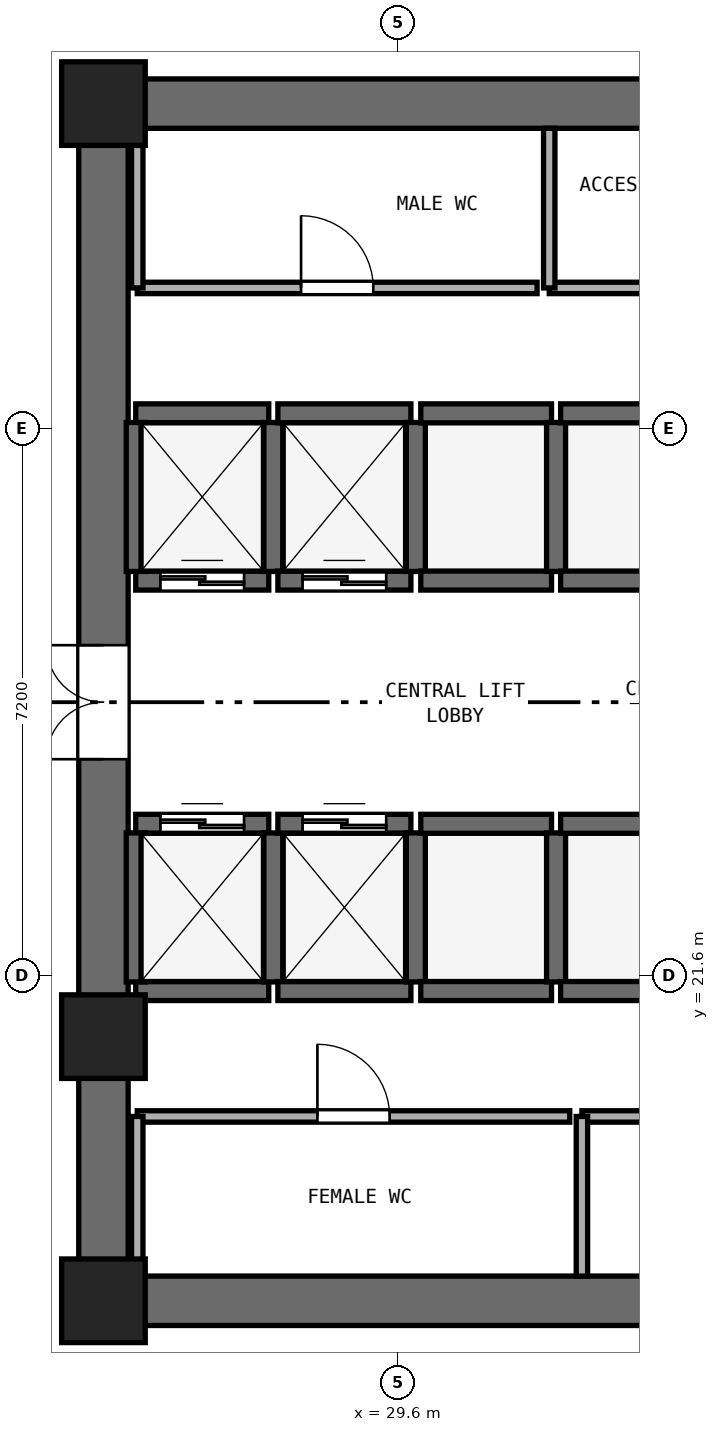
"""IFC4 building model, lengths in metres.
Left out: names, types, materials, properties, quantities, classifications, styles, units other than length and angle.
Written with IfcOpenShell. Run it as: python <this file> out.ifc"""

import sys

from ifc_helpers import new_model, si_unit, direction, frame, frame_2d, origin, origin_2d, place, context, subcontext, project, spatial, rectangle, extrude, element, fill, save


model = new_model("IFC4")
c1 = context("Model", 3, precision=1e-05, world=origin(), true_north=direction((0.0, 1.0)))
c2 = subcontext(c1, "Body", "Model", "MODEL_VIEW")
j1 = project(units=[si_unit("LENGTHUNIT", "METRE"), si_unit("PLANEANGLEUNIT", "RADIAN")], contexts=[c1])
p1 = place(None, origin())
s1 = spatial("IfcSite", under=j1, at=p1, CompositionType="ELEMENT")
p2 = place(p1, origin())
s2 = spatial("IfcBuilding", under=s1, at=p2, CompositionType="ELEMENT")
p3 = place(p2, frame((0.0, 0.0, 89.6)))
s3 = spatial("IfcBuildingStorey", under=s2, at=p3, CompositionType="ELEMENT", Elevation=89.6)
for number, where, z_axis, x_axis in (
    (1, (25.4, 17.325, 0.0), (0.0, 0.0, 1.0), (1.0, 0.0, 0.0)),
    (2, (25.4, 33.075, 0.0), (0.0, 0.0, 1.0), (1.0, 0.0, 0.0)),
):
    element("IfcWall", number, at=place(p3, frame(where, z_axis=z_axis, x_axis=x_axis)), inside=s3, PredefinedType="SHEAR", context=c2, shape_type="SweptSolid", body=[
        extrude(rectangle(XDim=23.2, YDim=0.65, at=frame_2d((11.6, 0.0))), origin(), (0.0, 0.0, 1.0), 3.525),
    ])
p4 = place(p3, frame((25.725, 17.65, 0.0), z_axis=(0.0, 0.0, 1.0), x_axis=(0.0, 1.0, 0.0)))
e3 = element("IfcWall", 3, at=p4, inside=s3, PredefinedType="SHEAR", context=c2, shape_type="SweptSolid", body=[
    extrude(rectangle(XDim=15.1, YDim=0.65, at=frame_2d((7.55, 0.0))), origin(), (0.0, 0.0, 1.0), 3.525),
])
p5 = place(p4, frame((6.8, 0.0, 0.0)))
e4 = element("IfcOpeningElement", 4, at=p5, cuts=e3, PredefinedType="OPENING", context=c2, shape_type="SweptSolid", body=[
    extrude(rectangle(XDim=1.5, YDim=2.15, at=frame_2d((0.75, 1.075))), frame((0.0, 0.335, 0.0), z_axis=(0.0, -1.0, 0.0), x_axis=(1.0, 0.0, 0.0)), (0.0, 0.0, 1.0), 0.67),
])
for number, where, z_axis, x_axis in (
    (5, (25.725, 17.325, 0.0), (0.0, 0.0, 1.0), (1.0, 0.0, 0.0)),
    (6, (25.725, 33.075, 0.0), (0.0, 0.0, 1.0), (1.0, 0.0, 0.0)),
    (7, (25.725, 20.8, 0.0), (0.0, 0.0, 1.0), (1.0, 0.0, 0.0)),
):
    element("IfcColumn", number, at=place(p3, frame(where, z_axis=z_axis, x_axis=x_axis)), inside=s3, PredefinedType="PILASTER", context=c2, shape_type="SweptSolid", body=[
        extrude(rectangle(XDim=1.1, YDim=1.1, at=origin_2d()), origin(), (0.0, 0.0, 1.0), 3.8),
    ])
p6 = place(p3, frame((26.15, 26.8, 0.0), z_axis=(0.0, 0.0, 1.0), x_axis=(1.0, 0.0, 0.0)))
e8 = element("IfcWall", 8, at=p6, inside=s3, PredefinedType="SHEAR", context=c2, shape_type="SweptSolid", body=[
    extrude(rectangle(XDim=1.75, YDim=0.25, at=frame_2d((0.875, 0.0))), origin(), (0.0, 0.0, 1.0), 3.525),
])
p7 = place(p6, frame((0.325, 0.0, 0.0)))
e9 = element("IfcOpeningElement", 9, at=p7, cuts=e8, PredefinedType="OPENING", context=c2, shape_type="SweptSolid", body=[
    extrude(rectangle(XDim=1.1, YDim=2.15, at=frame_2d((0.55, 1.075))), frame((0.0, 0.135, 0.0), z_axis=(0.0, -1.0, 0.0), x_axis=(1.0, 0.0, 0.0)), (0.0, 0.0, 1.0), 0.27),
])
p8 = place(p3, frame((26.15, 29.0, 0.0), z_axis=(0.0, 0.0, 1.0), x_axis=(1.0, 0.0, 0.0)))
e10 = element("IfcWall", 10, at=p8, inside=s3, PredefinedType="SHEAR", context=c2, shape_type="SweptSolid", body=[
    extrude(rectangle(XDim=1.75, YDim=0.25, at=frame_2d((0.875, 0.0))), origin(), (0.0, 0.0, 1.0), 3.525),
])
for number, where, z_axis, x_axis in (
    (11, (26.15, 26.92, 0.0), (0.0, 0.0, 1.0), (0.0, 1.0, 0.0)),
    (12, (27.96, 26.92, 0.0), (0.0, 0.0, 1.0), (0.0, 1.0, 0.0)),
):
    element("IfcWall", number, at=place(p3, frame(where, z_axis=z_axis, x_axis=x_axis)), inside=s3, PredefinedType="SHEAR", context=c2, shape_type="SweptSolid", body=[
        extrude(rectangle(XDim=1.96, YDim=0.25, at=frame_2d((0.98, 0.0))), origin(), (0.0, 0.0, 1.0), 3.525),
    ])
p9 = place(p3, frame((28.02, 26.8, 0.0), z_axis=(0.0, 0.0, 1.0), x_axis=(1.0, 0.0, 0.0)))
e13 = element("IfcWall", 13, at=p9, inside=s3, PredefinedType="SHEAR", context=c2, shape_type="SweptSolid", body=[
    extrude(rectangle(XDim=1.75, YDim=0.25, at=frame_2d((0.875, 0.0))), origin(), (0.0, 0.0, 1.0), 3.525),
])
p10 = place(p9, frame((0.325, 0.0, 0.0)))
e14 = element("IfcOpeningElement", 14, at=p10, cuts=e13, PredefinedType="OPENING", context=c2, shape_type="SweptSolid", body=[
    extrude(rectangle(XDim=1.1, YDim=2.15, at=frame_2d((0.55, 1.075))), frame((0.0, 0.135, 0.0), z_axis=(0.0, -1.0, 0.0), x_axis=(1.0, 0.0, 0.0)), (0.0, 0.0, 1.0), 0.27),
])
p11 = place(p3, frame((28.02, 29.0, 0.0), z_axis=(0.0, 0.0, 1.0), x_axis=(1.0, 0.0, 0.0)))
e15 = element("IfcWall", 15, at=p11, inside=s3, PredefinedType="SHEAR", context=c2, shape_type="SweptSolid", body=[
    extrude(rectangle(XDim=1.75, YDim=0.25, at=frame_2d((0.875, 0.0))), origin(), (0.0, 0.0, 1.0), 3.525),
])
p12 = place(p3, frame((29.835, 26.92, 0.0), z_axis=(0.0, 0.0, 1.0), x_axis=(0.0, 1.0, 0.0)))
e16 = element("IfcWall", 16, at=p12, inside=s3, PredefinedType="SHEAR", context=c2, shape_type="SweptSolid", body=[
    extrude(rectangle(XDim=1.96, YDim=0.25, at=frame_2d((0.98, 0.0))), origin(), (0.0, 0.0, 1.0), 3.525),
])
p13 = place(p3, frame((26.15, 21.4, 0.0), z_axis=(0.0, 0.0, 1.0), x_axis=(1.0, 0.0, 0.0)))
e17 = element("IfcWall", 17, at=p13, inside=s3, PredefinedType="SHEAR", context=c2, shape_type="SweptSolid", body=[
    extrude(rectangle(XDim=1.75, YDim=0.25, at=frame_2d((0.875, 0.0))), origin(), (0.0, 0.0, 1.0), 3.525),
])
p14 = place(p3, frame((26.15, 23.6, 0.0), z_axis=(0.0, 0.0, 1.0), x_axis=(1.0, 0.0, 0.0)))
e18 = element("IfcWall", 18, at=p14, inside=s3, PredefinedType="SHEAR", context=c2, shape_type="SweptSolid", body=[
    extrude(rectangle(XDim=1.75, YDim=0.25, at=frame_2d((0.875, 0.0))), origin(), (0.0, 0.0, 1.0), 3.525),
])
p15 = place(p14, frame((0.325, 0.0, 0.0)))
e19 = element("IfcOpeningElement", 19, at=p15, cuts=e18, PredefinedType="OPENING", context=c2, shape_type="SweptSolid", body=[
    extrude(rectangle(XDim=1.1, YDim=2.15, at=frame_2d((0.55, 1.075))), frame((0.0, 0.135, 0.0), z_axis=(0.0, -1.0, 0.0), x_axis=(1.0, 0.0, 0.0)), (0.0, 0.0, 1.0), 0.27),
])
for number, where, z_axis, x_axis in (
    (20, (26.15, 21.52, 0.0), (0.0, 0.0, 1.0), (0.0, 1.0, 0.0)),
    (21, (27.96, 21.52, 0.0), (0.0, 0.0, 1.0), (0.0, 1.0, 0.0)),
):
    element("IfcWall", number, at=place(p3, frame(where, z_axis=z_axis, x_axis=x_axis)), inside=s3, PredefinedType="SHEAR", context=c2, shape_type="SweptSolid", body=[
        extrude(rectangle(XDim=1.96, YDim=0.25, at=frame_2d((0.98, 0.0))), origin(), (0.0, 0.0, 1.0), 3.525),
    ])
p16 = place(p3, frame((28.02, 21.4, 0.0), z_axis=(0.0, 0.0, 1.0), x_axis=(1.0, 0.0, 0.0)))
e22 = element("IfcWall", 22, at=p16, inside=s3, PredefinedType="SHEAR", context=c2, shape_type="SweptSolid", body=[
    extrude(rectangle(XDim=1.75, YDim=0.25, at=frame_2d((0.875, 0.0))), origin(), (0.0, 0.0, 1.0), 3.525),
])
p17 = place(p3, frame((28.02, 23.6, 0.0), z_axis=(0.0, 0.0, 1.0), x_axis=(1.0, 0.0, 0.0)))
e23 = element("IfcWall", 23, at=p17, inside=s3, PredefinedType="SHEAR", context=c2, shape_type="SweptSolid", body=[
    extrude(rectangle(XDim=1.75, YDim=0.25, at=frame_2d((0.875, 0.0))), origin(), (0.0, 0.0, 1.0), 3.525),
])
p18 = place(p17, frame((0.325, 0.0, 0.0)))
e24 = element("IfcOpeningElement", 24, at=p18, cuts=e23, PredefinedType="OPENING", context=c2, shape_type="SweptSolid", body=[
    extrude(rectangle(XDim=1.1, YDim=2.15, at=frame_2d((0.55, 1.075))), frame((0.0, 0.135, 0.0), z_axis=(0.0, -1.0, 0.0), x_axis=(1.0, 0.0, 0.0)), (0.0, 0.0, 1.0), 0.27),
])
p19 = place(p3, frame((29.835, 21.52, 0.0), z_axis=(0.0, 0.0, 1.0), x_axis=(0.0, 1.0, 0.0)))
e25 = element("IfcWall", 25, at=p19, inside=s3, PredefinedType="SHEAR", context=c2, shape_type="SweptSolid", body=[
    extrude(rectangle(XDim=1.96, YDim=0.25, at=frame_2d((0.98, 0.0))), origin(), (0.0, 0.0, 1.0), 3.525),
])
for number, where, z_axis, x_axis in (
    (26, (29.9, 21.4, 0.0), (0.0, 0.0, 1.0), (1.0, 0.0, 0.0)),
    (27, (29.9, 23.6, 0.0), (0.0, 0.0, 1.0), (1.0, 0.0, 0.0)),
):
    element("IfcWall", number, at=place(p3, frame(where, z_axis=z_axis, x_axis=x_axis)), inside=s3, PredefinedType="SHEAR", context=c2, shape_type="SweptSolid", body=[
        extrude(rectangle(XDim=1.72, YDim=0.25, at=frame_2d((0.86, 0.0))), origin(), (0.0, 0.0, 1.0), 3.525),
    ])
p20 = place(p3, frame((31.68, 21.52, 0.0), z_axis=(0.0, 0.0, 1.0), x_axis=(0.0, 1.0, 0.0)))
e28 = element("IfcWall", 28, at=p20, inside=s3, PredefinedType="SHEAR", context=c2, shape_type="SweptSolid", body=[
    extrude(rectangle(XDim=1.96, YDim=0.25, at=frame_2d((0.98, 0.0))), origin(), (0.0, 0.0, 1.0), 3.525),
])
for number, where, z_axis, x_axis in (
    (29, (31.74, 21.4, 0.0), (0.0, 0.0, 1.0), (1.0, 0.0, 0.0)),
    (30, (31.74, 23.6, 0.0), (0.0, 0.0, 1.0), (1.0, 0.0, 0.0)),
):
    element("IfcWall", number, at=place(p3, frame(where, z_axis=z_axis, x_axis=x_axis)), inside=s3, PredefinedType="SHEAR", context=c2, shape_type="SweptSolid", body=[
        extrude(rectangle(XDim=1.72, YDim=0.25, at=frame_2d((0.86, 0.0))), origin(), (0.0, 0.0, 1.0), 3.525),
    ])
for number, where, z_axis, x_axis in (
    (31, (29.9, 26.8, 0.0), (0.0, 0.0, 1.0), (1.0, 0.0, 0.0)),
    (32, (29.9, 29.0, 0.0), (0.0, 0.0, 1.0), (1.0, 0.0, 0.0)),
):
    element("IfcWall", number, at=place(p3, frame(where, z_axis=z_axis, x_axis=x_axis)), inside=s3, PredefinedType="SHEAR", context=c2, shape_type="SweptSolid", body=[
        extrude(rectangle(XDim=1.72, YDim=0.25, at=frame_2d((0.86, 0.0))), origin(), (0.0, 0.0, 1.0), 3.525),
    ])
p21 = place(p3, frame((31.68, 26.92, 0.0), z_axis=(0.0, 0.0, 1.0), x_axis=(0.0, 1.0, 0.0)))
e33 = element("IfcWall", 33, at=p21, inside=s3, PredefinedType="SHEAR", context=c2, shape_type="SweptSolid", body=[
    extrude(rectangle(XDim=1.96, YDim=0.25, at=frame_2d((0.98, 0.0))), origin(), (0.0, 0.0, 1.0), 3.525),
])
for number, where, z_axis, x_axis in (
    (34, (31.74, 26.8, 0.0), (0.0, 0.0, 1.0), (1.0, 0.0, 0.0)),
    (35, (31.74, 29.0, 0.0), (0.0, 0.0, 1.0), (1.0, 0.0, 0.0)),
):
    element("IfcWall", number, at=place(p3, frame(where, z_axis=z_axis, x_axis=x_axis)), inside=s3, PredefinedType="SHEAR", context=c2, shape_type="SweptSolid", body=[
        extrude(rectangle(XDim=1.72, YDim=0.25, at=frame_2d((0.86, 0.0))), origin(), (0.0, 0.0, 1.0), 3.525),
    ])
p22 = place(p3, frame((26.17, 30.65, 0.0), z_axis=(0.0, 0.0, 1.0), x_axis=(1.0, 0.0, 0.0)))
e36 = element("IfcWall", 36, at=p22, inside=s3, PredefinedType="PARTITIONING", context=c2, shape_type="SweptSolid", body=[
    extrude(rectangle(XDim=5.26, YDim=0.15, at=frame_2d((2.63, 0.0))), origin(), (0.0, 0.0, 1.0), 3.525),
])
p23 = place(p22, frame((2.155, 0.0, 0.0)))
e37 = element("IfcOpeningElement", 37, at=p23, cuts=e36, PredefinedType="OPENING", context=c2, shape_type="SweptSolid", body=[
    extrude(rectangle(XDim=0.95, YDim=2.1, at=frame_2d((0.475, 1.05))), frame((0.0, 0.085, 0.0), z_axis=(0.0, -1.0, 0.0), x_axis=(1.0, 0.0, 0.0)), (0.0, 0.0, 1.0), 0.17),
])
p24 = place(p3, frame((26.17, 30.65, 0.0), z_axis=(0.0, 0.0, 1.0), x_axis=(0.0, 1.0, 0.0)))
e38 = element("IfcWall", 38, at=p24, inside=s3, PredefinedType="PARTITIONING", context=c2, shape_type="SweptSolid", body=[
    extrude(rectangle(XDim=2.1, YDim=0.15, at=frame_2d((1.05, 0.0))), origin(), (0.0, 0.0, 1.0), 3.525),
])
p25 = place(p3, frame((31.59, 30.65, 0.0), z_axis=(0.0, 0.0, 1.0), x_axis=(1.0, 0.0, 0.0)))
e39 = element("IfcWall", 39, at=p25, inside=s3, PredefinedType="PARTITIONING", context=c2, shape_type="SweptSolid", body=[
    extrude(rectangle(XDim=5.26, YDim=0.15, at=frame_2d((2.63, 0.0))), origin(), (0.0, 0.0, 1.0), 3.525),
])
p26 = place(p25, frame((2.155, 0.0, 0.0)))
e40 = element("IfcOpeningElement", 40, at=p26, cuts=e39, PredefinedType="OPENING", context=c2, shape_type="SweptSolid", body=[
    extrude(rectangle(XDim=0.95, YDim=2.1, at=frame_2d((0.475, 1.05))), frame((0.0, 0.085, 0.0), z_axis=(0.0, -1.0, 0.0), x_axis=(1.0, 0.0, 0.0)), (0.0, 0.0, 1.0), 0.17),
])
p27 = place(p3, frame((31.59, 30.65, 0.0), z_axis=(0.0, 0.0, 1.0), x_axis=(0.0, 1.0, 0.0)))
e41 = element("IfcWall", 41, at=p27, inside=s3, PredefinedType="PARTITIONING", context=c2, shape_type="SweptSolid", body=[
    extrude(rectangle(XDim=2.1, YDim=0.15, at=frame_2d((1.05, 0.0))), origin(), (0.0, 0.0, 1.0), 3.525),
])
p28 = place(p3, frame((26.17, 19.75, 0.0), z_axis=(0.0, 0.0, 1.0), x_axis=(1.0, 0.0, 0.0)))
e42 = element("IfcWall", 42, at=p28, inside=s3, PredefinedType="PARTITIONING", context=c2, shape_type="SweptSolid", body=[
    extrude(rectangle(XDim=5.69, YDim=0.15, at=frame_2d((2.845, 0.0))), origin(), (0.0, 0.0, 1.0), 3.525),
])
p29 = place(p28, frame((2.37, 0.0, 0.0)))
e43 = element("IfcOpeningElement", 43, at=p29, cuts=e42, PredefinedType="OPENING", context=c2, shape_type="SweptSolid", body=[
    extrude(rectangle(XDim=0.95, YDim=2.1, at=frame_2d((0.475, 1.05))), frame((0.0, 0.085, 0.0), z_axis=(0.0, -1.0, 0.0), x_axis=(1.0, 0.0, 0.0)), (0.0, 0.0, 1.0), 0.17),
])
p30 = place(p3, frame((26.17, 17.65, 0.0), z_axis=(0.0, 0.0, 1.0), x_axis=(0.0, 1.0, 0.0)))
e44 = element("IfcWall", 44, at=p30, inside=s3, PredefinedType="PARTITIONING", context=c2, shape_type="SweptSolid", body=[
    extrude(rectangle(XDim=2.1, YDim=0.15, at=frame_2d((1.05, 0.0))), origin(), (0.0, 0.0, 1.0), 3.525),
])
p31 = place(p3, frame((32.02, 19.75, 0.0), z_axis=(0.0, 0.0, 1.0), x_axis=(1.0, 0.0, 0.0)))
e45 = element("IfcWall", 45, at=p31, inside=s3, PredefinedType="PARTITIONING", context=c2, shape_type="SweptSolid", body=[
    extrude(rectangle(XDim=4.83, YDim=0.15, at=frame_2d((2.415, 0.0))), origin(), (0.0, 0.0, 1.0), 3.525),
])
p32 = place(p31, frame((1.965, 0.0, 0.0)))
e46 = element("IfcOpeningElement", 46, at=p32, cuts=e45, PredefinedType="OPENING", context=c2, shape_type="SweptSolid", body=[
    extrude(rectangle(XDim=0.9, YDim=2.1, at=frame_2d((0.45, 1.05))), frame((0.0, 0.085, 0.0), z_axis=(0.0, -1.0, 0.0), x_axis=(1.0, 0.0, 0.0)), (0.0, 0.0, 1.0), 0.17),
])
p33 = place(p3, frame((32.02, 17.65, 0.0), z_axis=(0.0, 0.0, 1.0), x_axis=(0.0, 1.0, 0.0)))
e47 = element("IfcWall", 47, at=p33, inside=s3, PredefinedType="PARTITIONING", context=c2, shape_type="SweptSolid", body=[
    extrude(rectangle(XDim=2.1, YDim=0.15, at=frame_2d((1.05, 0.0))), origin(), (0.0, 0.0, 1.0), 3.525),
])
p34 = place(p7, origin())
e48 = element("IfcDoor", 48, at=p34, inside=s3, OperationType="DOUBLE_DOOR_SLIDING", PredefinedType="DOOR", context=c2, shape_type="SweptSolid", body=[
    extrude(rectangle(XDim=1.1, YDim=2.15, at=frame_2d((0.55, 1.075))), frame((0.0, 0.025, 0.0), z_axis=(0.0, -1.0, 0.0), x_axis=(1.0, 0.0, 0.0)), (0.0, 0.0, 1.0), 0.05),
])
fill(e9, e48)
p35 = place(p10, origin())
e49 = element("IfcDoor", 49, at=p35, inside=s3, OperationType="DOUBLE_DOOR_SLIDING", PredefinedType="DOOR", context=c2, shape_type="SweptSolid", body=[
    extrude(rectangle(XDim=1.1, YDim=2.15, at=frame_2d((0.55, 1.075))), frame((0.0, 0.025, 0.0), z_axis=(0.0, -1.0, 0.0), x_axis=(1.0, 0.0, 0.0)), (0.0, 0.0, 1.0), 0.05),
])
fill(e14, e49)
p36 = place(p15, origin())
e50 = element("IfcDoor", 50, at=p36, inside=s3, OperationType="DOUBLE_DOOR_SLIDING", PredefinedType="DOOR", context=c2, shape_type="SweptSolid", body=[
    extrude(rectangle(XDim=1.1, YDim=2.15, at=frame_2d((0.55, 1.075))), frame((0.0, 0.025, 0.0), z_axis=(0.0, -1.0, 0.0), x_axis=(1.0, 0.0, 0.0)), (0.0, 0.0, 1.0), 0.05),
])
fill(e19, e50)
p37 = place(p18, origin())
e51 = element("IfcDoor", 51, at=p37, inside=s3, OperationType="DOUBLE_DOOR_SLIDING", PredefinedType="DOOR", context=c2, shape_type="SweptSolid", body=[
    extrude(rectangle(XDim=1.1, YDim=2.15, at=frame_2d((0.55, 1.075))), frame((0.0, 0.025, 0.0), z_axis=(0.0, -1.0, 0.0), x_axis=(1.0, 0.0, 0.0)), (0.0, 0.0, 1.0), 0.05),
])
fill(e24, e51)
p38 = place(p5, origin())
e52 = element("IfcDoor", 52, at=p38, inside=s3, OperationType="DOUBLE_DOOR_SINGLE_SWING", PredefinedType="DOOR", context=c2, shape_type="SweptSolid", body=[
    extrude(rectangle(XDim=1.5, YDim=2.15, at=frame_2d((0.75, 1.075))), frame((0.0, 0.025, 0.0), z_axis=(0.0, -1.0, 0.0), x_axis=(1.0, 0.0, 0.0)), (0.0, 0.0, 1.0), 0.05),
])
fill(e4, e52)
p39 = place(p23, origin())
e53 = element("IfcDoor", 53, at=p39, inside=s3, OperationType="SINGLE_SWING_LEFT", PredefinedType="DOOR", context=c2, shape_type="SweptSolid", body=[
    extrude(rectangle(XDim=0.95, YDim=2.1, at=frame_2d((0.475, 1.05))), frame((0.0, 0.025, 0.0), z_axis=(0.0, -1.0, 0.0), x_axis=(1.0, 0.0, 0.0)), (0.0, 0.0, 1.0), 0.05),
])
fill(e37, e53)
p40 = place(p29, origin())
e54 = element("IfcDoor", 54, at=p40, inside=s3, OperationType="SINGLE_SWING_LEFT", PredefinedType="DOOR", context=c2, shape_type="SweptSolid", body=[
    extrude(rectangle(XDim=0.95, YDim=2.1, at=frame_2d((0.475, 1.05))), frame((0.0, 0.025, 0.0), z_axis=(0.0, -1.0, 0.0), x_axis=(1.0, 0.0, 0.0)), (0.0, 0.0, 1.0), 0.05),
])
fill(e43, e54)
save(model, sys.argv[1])
